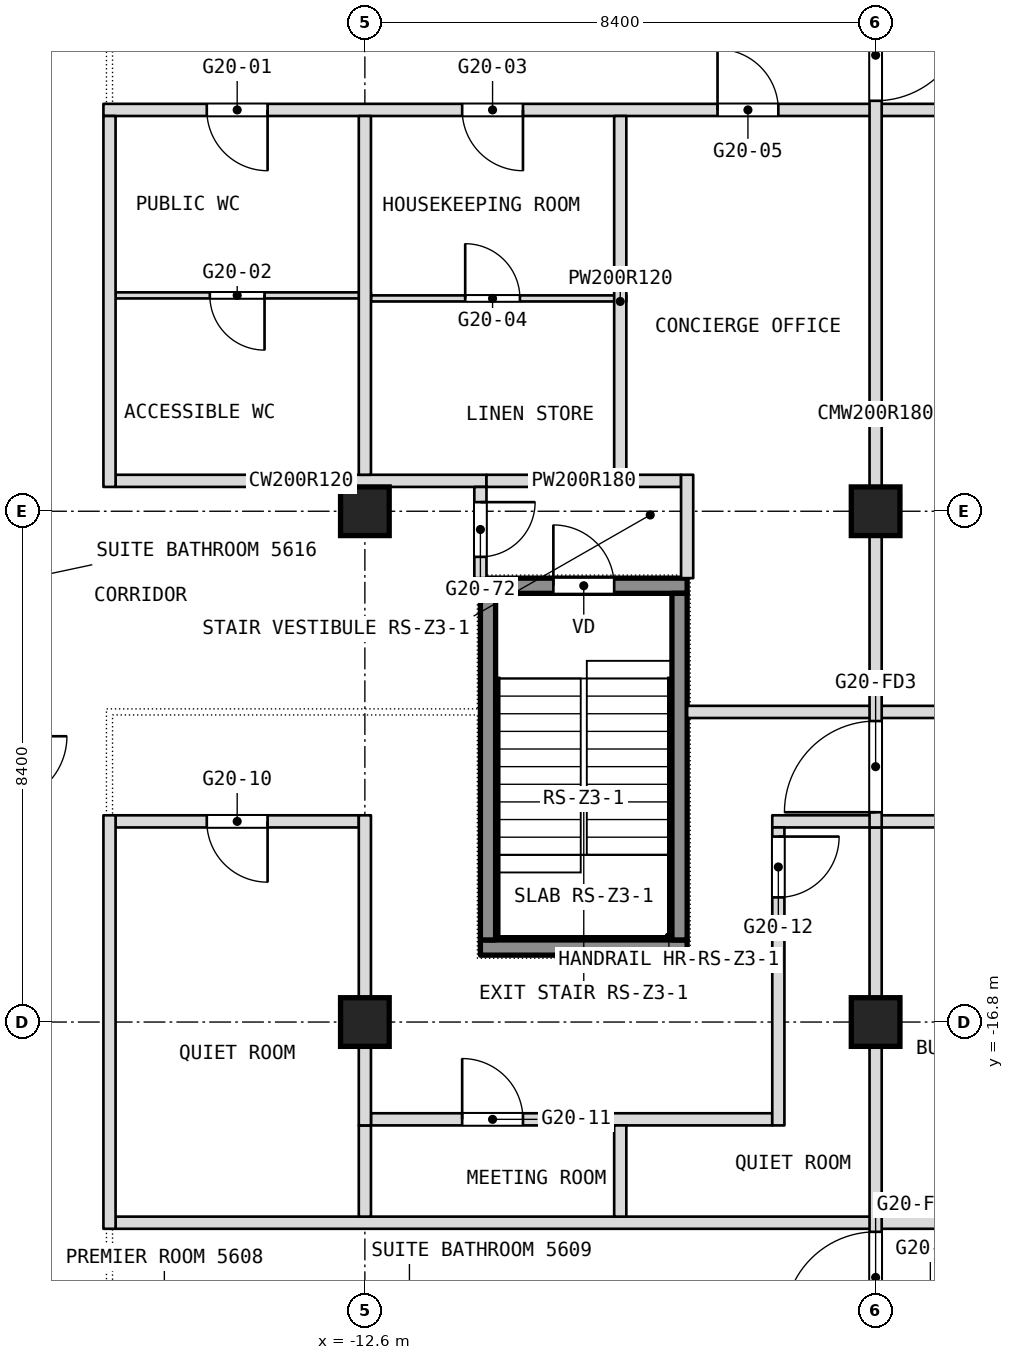
"""IFC4 building model, lengths in metres.
Left out: names, types, materials, properties, quantities, classifications, styles, units other than length and angle.
Written with IfcOpenShell. Run it as: python <this file> out.ifc"""

import sys

from ifc_helpers import new_model, si_unit, direction, frame, frame_2d, origin, origin_2d, place, context, subcontext, project, spatial, rectangle, extrude, element, fill, save


model = new_model("IFC4")
c1 = context("Model", 3, precision=1e-05, world=origin(), true_north=direction((0.0, 1.0)))
c2 = subcontext(c1, "Body", "Model", "MODEL_VIEW")
j1 = project(units=[si_unit("LENGTHUNIT", "METRE"), si_unit("PLANEANGLEUNIT", "RADIAN")], contexts=[c1])
p1 = place(None, origin())
s1 = spatial("IfcSite", under=j1, at=p1, CompositionType="ELEMENT")
p2 = place(p1, origin())
s2 = spatial("IfcBuilding", under=s1, at=p2, CompositionType="ELEMENT")
p3 = place(p2, frame((0.0, 0.0, 238.1)))
s3 = spatial("IfcBuildingStorey", under=s2, at=p3, CompositionType="ELEMENT", Elevation=238.1)
for number, where, z_axis, x_axis in (
    (1, (-12.6, -16.8, 0.0), (0.0, 0.0, 1.0), (1.0, 0.0, 0.0)),
    (2, (-12.6, -8.4, 0.0), (0.0, 0.0, 1.0), (1.0, 0.0, 0.0)),
    (3, (-4.2, -16.8, 0.0), (0.0, 0.0, 1.0), (1.0, 0.0, 0.0)),
    (4, (-4.2, -8.4, 0.0), (0.0, 0.0, 1.0), (1.0, 0.0, 0.0)),
):
    element("IfcColumn", number, at=place(p3, frame(where, z_axis=z_axis, x_axis=x_axis)), inside=s3, PredefinedType="COLUMN", context=c2, shape_type="SweptSolid", body=[
        extrude(rectangle(XDim=0.8, YDim=0.8, at=origin_2d()), origin(), (0.0, 0.0, 1.0), 3.6),
    ])
p4 = place(p3, frame((-16.7, -20.1, 0.0), z_axis=(0.0, 0.0, 1.0), x_axis=(1.0, 0.0, 0.0)))
e5 = element("IfcWall", 5, at=p4, inside=s3, PredefinedType="PARTITIONING", context=c2, shape_type="SweptSolid", body=[
    extrude(rectangle(XDim=33.4, YDim=0.2, at=frame_2d((16.7, 0.0))), origin(), (0.0, 0.0, 1.0), 3.34),
])
p5 = place(p3, frame((-12.5, -18.4, 0.0), z_axis=(0.0, 0.0, 1.0), x_axis=(1.0, 0.0, 0.0)))
e6 = element("IfcWall", 6, at=p5, inside=s3, PredefinedType="PARTITIONING", context=c2, shape_type="SweptSolid", body=[
    extrude(rectangle(XDim=6.6, YDim=0.2, at=frame_2d((3.3, 0.0))), origin(), (0.0, 0.0, 1.0), 3.34),
])
p6 = place(p5, frame((1.5, 0.0, 0.0)))
e7 = element("IfcOpeningElement", 7, at=p6, cuts=e6, PredefinedType="OPENING", context=c2, shape_type="SweptSolid", body=[
    extrude(rectangle(XDim=1.0, YDim=2.1, at=frame_2d((0.5, 1.05))), frame((0.0, 0.1, 0.0), z_axis=(0.0, -1.0, 0.0), x_axis=(1.0, 0.0, 0.0)), (0.0, 0.0, 1.0), 0.2),
])
p7 = place(p3, frame((-16.7, -13.5, 0.0), z_axis=(0.0, 0.0, 1.0), x_axis=(1.0, 0.0, 0.0)))
e8 = element("IfcWall", 8, at=p7, inside=s3, PredefinedType="PARTITIONING", context=c2, shape_type="SweptSolid", body=[
    extrude(rectangle(XDim=4.0, YDim=0.2, at=frame_2d((2.0, 0.0))), origin(), (0.0, 0.0, 1.0), 3.34),
])
p8 = place(p7, frame((1.5, 0.0, 0.0)))
e9 = element("IfcOpeningElement", 9, at=p8, cuts=e8, PredefinedType="OPENING", context=c2, shape_type="SweptSolid", body=[
    extrude(rectangle(XDim=1.0, YDim=2.1, at=frame_2d((0.5, 1.05))), frame((0.0, 0.1, 0.0), z_axis=(0.0, -1.0, 0.0), x_axis=(1.0, 0.0, 0.0)), (0.0, 0.0, 1.0), 0.2),
])
p9 = place(p3, frame((-5.9, -13.5, 0.0), z_axis=(0.0, 0.0, 1.0), x_axis=(1.0, 0.0, 0.0)))
e10 = element("IfcWall", 10, at=p9, inside=s3, PredefinedType="PARTITIONING", context=c2, shape_type="SweptSolid", body=[
    extrude(rectangle(XDim=11.6, YDim=0.2, at=frame_2d((5.8, 0.0))), origin(), (0.0, 0.0, 1.0), 3.34),
])
p10 = place(p9, frame((3.3, 0.0, 0.0)))
e11 = element("IfcOpeningElement", 11, at=p10, cuts=e10, PredefinedType="OPENING", context=c2, shape_type="SweptSolid", body=[
    extrude(rectangle(XDim=1.0, YDim=2.1, at=frame_2d((0.5, 1.05))), frame((0.0, 0.1, 0.0), z_axis=(0.0, -1.0, 0.0), x_axis=(1.0, 0.0, 0.0)), (0.0, 0.0, 1.0), 0.2),
])
p11 = place(p9, frame((7.5, 0.0, 0.0)))
e12 = element("IfcOpeningElement", 12, at=p11, cuts=e10, PredefinedType="OPENING", context=c2, shape_type="SweptSolid", body=[
    extrude(rectangle(XDim=1.0, YDim=2.1, at=frame_2d((0.5, 1.05))), frame((0.0, 0.1, 0.0), z_axis=(0.0, -1.0, 0.0), x_axis=(1.0, 0.0, 0.0)), (0.0, 0.0, 1.0), 0.2),
])
p12 = place(p3, frame((-7.3, -11.7, 0.0), z_axis=(0.0, 0.0, 1.0), x_axis=(1.0, 0.0, 0.0)))
e13 = element("IfcWall", 13, at=p12, inside=s3, PredefinedType="PARTITIONING", context=c2, shape_type="SweptSolid", body=[
    extrude(rectangle(XDim=14.6, YDim=0.2, at=frame_2d((7.3, 0.0))), origin(), (0.0, 0.0, 1.0), 3.34),
])
p13 = place(p3, frame((-16.7, -7.9, 0.0), z_axis=(0.0, 0.0, 1.0), x_axis=(1.0, 0.0, 0.0)))
e14 = element("IfcWall", 14, at=p13, inside=s3, PredefinedType="PARTITIONING", context=c2, shape_type="SweptSolid", body=[
    extrude(rectangle(XDim=6.1, YDim=0.2, at=frame_2d((3.05, 0.0))), origin(), (0.0, 0.0, 1.0), 3.34),
])
p14 = place(p3, frame((-10.6, -7.9, 0.0), z_axis=(0.0, 0.0, 1.0), x_axis=(1.0, 0.0, 0.0)))
e15 = element("IfcWall", 15, at=p14, inside=s3, PredefinedType="PARTITIONING", context=c2, shape_type="SweptSolid", body=[
    extrude(rectangle(XDim=3.2, YDim=0.2, at=frame_2d((1.6, 0.0))), origin(), (0.0, 0.0, 1.0), 3.34),
])
p15 = place(p3, frame((-12.5, -4.9, 0.0), z_axis=(0.0, 0.0, 1.0), x_axis=(1.0, 0.0, 0.0)))
e16 = element("IfcWall", 16, at=p15, inside=s3, PredefinedType="PARTITIONING", context=c2, shape_type="SweptSolid", body=[
    extrude(rectangle(XDim=4.2, YDim=0.1, at=frame_2d((2.1, 0.0))), origin(), (0.0, 0.0, 1.0), 3.34),
])
p16 = place(p15, frame((1.55, 0.0, 0.0)))
e17 = element("IfcOpeningElement", 17, at=p16, cuts=e16, PredefinedType="OPENING", context=c2, shape_type="SweptSolid", body=[
    extrude(rectangle(XDim=0.9, YDim=2.1, at=frame_2d((0.45, 1.05))), frame((0.0, 0.05, 0.0), z_axis=(0.0, -1.0, 0.0), x_axis=(1.0, 0.0, 0.0)), (0.0, 0.0, 1.0), 0.1),
])
p17 = place(p3, frame((-16.7, -4.85, 0.0), z_axis=(0.0, 0.0, 1.0), x_axis=(1.0, 0.0, 0.0)))
e18 = element("IfcWall", 18, at=p17, inside=s3, PredefinedType="PARTITIONING", context=c2, shape_type="SweptSolid", body=[
    extrude(rectangle(XDim=4.2, YDim=0.1, at=frame_2d((2.1, 0.0))), origin(), (0.0, 0.0, 1.0), 3.34),
])
p18 = place(p17, frame((1.55, 0.0, 0.0)))
e19 = element("IfcOpeningElement", 19, at=p18, cuts=e18, PredefinedType="OPENING", context=c2, shape_type="SweptSolid", body=[
    extrude(rectangle(XDim=0.9, YDim=2.1, at=frame_2d((0.45, 1.05))), frame((0.0, 0.05, 0.0), z_axis=(0.0, -1.0, 0.0), x_axis=(1.0, 0.0, 0.0)), (0.0, 0.0, 1.0), 0.1),
])
p19 = place(p3, frame((-16.9, -1.8, 0.0), z_axis=(0.0, 0.0, 1.0), x_axis=(1.0, 0.0, 0.0)))
e20 = element("IfcWall", 20, at=p19, inside=s3, PredefinedType="PARTITIONING", context=c2, shape_type="SweptSolid", body=[
    extrude(rectangle(XDim=33.8, YDim=0.2, at=frame_2d((16.9, 0.0))), origin(), (0.0, 0.0, 1.0), 3.34),
])
p20 = place(p19, frame((1.7, 0.0, 0.0)))
e21 = element("IfcOpeningElement", 21, at=p20, cuts=e20, PredefinedType="OPENING", context=c2, shape_type="SweptSolid", body=[
    extrude(rectangle(XDim=1.0, YDim=2.1, at=frame_2d((0.5, 1.05))), frame((0.0, 0.1, 0.0), z_axis=(0.0, -1.0, 0.0), x_axis=(1.0, 0.0, 0.0)), (0.0, 0.0, 1.0), 0.2),
])
p21 = place(p19, frame((5.9, 0.0, 0.0)))
e22 = element("IfcOpeningElement", 22, at=p21, cuts=e20, PredefinedType="OPENING", context=c2, shape_type="SweptSolid", body=[
    extrude(rectangle(XDim=1.0, YDim=2.1, at=frame_2d((0.5, 1.05))), frame((0.0, 0.1, 0.0), z_axis=(0.0, -1.0, 0.0), x_axis=(1.0, 0.0, 0.0)), (0.0, 0.0, 1.0), 0.2),
])
p22 = place(p19, frame((10.1, 0.0, 0.0)))
e23 = element("IfcOpeningElement", 23, at=p22, cuts=e20, PredefinedType="OPENING", context=c2, shape_type="SweptSolid", body=[
    extrude(rectangle(XDim=1.0, YDim=2.1, at=frame_2d((0.5, 1.05))), frame((0.0, 0.1, 0.0), z_axis=(0.0, -1.0, 0.0), x_axis=(1.0, 0.0, 0.0)), (0.0, 0.0, 1.0), 0.2),
])
p23 = place(p19, frame((16.0, 0.0, 0.0)))
e24 = element("IfcOpeningElement", 24, at=p23, cuts=e20, PredefinedType="OPENING", context=c2, shape_type="SweptSolid", body=[
    extrude(rectangle(XDim=1.8, YDim=2.1, at=frame_2d((0.9, 1.05))), frame((0.0, 0.1, 0.0), z_axis=(0.0, -1.0, 0.0), x_axis=(1.0, 0.0, 0.0)), (0.0, 0.0, 1.0), 0.2),
])
p24 = place(p19, frame((22.7, 0.0, 0.0)))
e25 = element("IfcOpeningElement", 25, at=p24, cuts=e20, PredefinedType="OPENING", context=c2, shape_type="SweptSolid", body=[
    extrude(rectangle(XDim=1.0, YDim=2.1, at=frame_2d((0.5, 1.05))), frame((0.0, 0.1, 0.0), z_axis=(0.0, -1.0, 0.0), x_axis=(1.0, 0.0, 0.0)), (0.0, 0.0, 1.0), 0.2),
])
p25 = place(p19, frame((26.9, 0.0, 0.0)))
e26 = element("IfcOpeningElement", 26, at=p25, cuts=e20, PredefinedType="OPENING", context=c2, shape_type="SweptSolid", body=[
    extrude(rectangle(XDim=1.0, YDim=2.1, at=frame_2d((0.5, 1.05))), frame((0.0, 0.1, 0.0), z_axis=(0.0, -1.0, 0.0), x_axis=(1.0, 0.0, 0.0)), (0.0, 0.0, 1.0), 0.2),
])
p26 = place(p19, frame((31.1, 0.0, 0.0)))
e27 = element("IfcOpeningElement", 27, at=p26, cuts=e20, PredefinedType="OPENING", context=c2, shape_type="SweptSolid", body=[
    extrude(rectangle(XDim=1.0, YDim=2.1, at=frame_2d((0.5, 1.05))), frame((0.0, 0.1, 0.0), z_axis=(0.0, -1.0, 0.0), x_axis=(1.0, 0.0, 0.0)), (0.0, 0.0, 1.0), 0.2),
])
p27 = place(p3, frame((-4.2, -22.0, 0.0), z_axis=(0.0, 0.0, 1.0), x_axis=(0.0, 1.0, 0.0)))
e28 = element("IfcWall", 28, at=p27, inside=s3, PredefinedType="PARTITIONING", context=c2, shape_type="SweptSolid", body=[
    extrude(rectangle(XDim=8.4, YDim=0.2, at=frame_2d((4.2, 0.0))), origin(), (0.0, 0.0, 1.0), 3.34),
])
p28 = place(p27, frame((0.25, 0.0, 0.0)))
e29 = element("IfcOpeningElement", 29, at=p28, cuts=e28, PredefinedType="OPENING", context=c2, shape_type="SweptSolid", body=[
    extrude(rectangle(XDim=1.5, YDim=2.1, at=frame_2d((0.75, 1.05))), frame((0.0, 0.1, 0.0), z_axis=(0.0, -1.0, 0.0), x_axis=(1.0, 0.0, 0.0)), (0.0, 0.0, 1.0), 0.2),
])
p29 = place(p3, frame((-4.2, -13.6, 0.0), z_axis=(0.0, 0.0, 1.0), x_axis=(0.0, 1.0, 0.0)))
e30 = element("IfcWall", 30, at=p29, inside=s3, PredefinedType="PARTITIONING", context=c2, shape_type="SweptSolid", body=[
    extrude(rectangle(XDim=13.6, YDim=0.2, at=frame_2d((6.8, 0.0))), origin(), (0.0, 0.0, 1.0), 3.34),
])
p30 = place(p29, frame((11.95, 0.0, 0.0)))
e31 = element("IfcOpeningElement", 31, at=p30, cuts=e30, PredefinedType="OPENING", context=c2, shape_type="SweptSolid", body=[
    extrude(rectangle(XDim=1.5, YDim=2.1, at=frame_2d((0.75, 1.05))), frame((0.0, 0.1, 0.0), z_axis=(0.0, -1.0, 0.0), x_axis=(1.0, 0.0, 0.0)), (0.0, 0.0, 1.0), 0.2),
])
p31 = place(p29, frame((0.25, 0.0, 0.0)))
e32 = element("IfcOpeningElement", 32, at=p31, cuts=e30, PredefinedType="OPENING", context=c2, shape_type="SweptSolid", body=[
    extrude(rectangle(XDim=1.5, YDim=2.1, at=frame_2d((0.75, 1.05))), frame((0.0, 0.1, 0.0), z_axis=(0.0, -1.0, 0.0), x_axis=(1.0, 0.0, 0.0)), (0.0, 0.0, 1.0), 0.2),
])
p32 = place(p3, frame((-5.8, -18.5, 0.0), z_axis=(0.0, 0.0, 1.0), x_axis=(0.0, 1.0, 0.0)))
e33 = element("IfcWall", 33, at=p32, inside=s3, PredefinedType="PARTITIONING", context=c2, shape_type="SweptSolid", body=[
    extrude(rectangle(XDim=4.9, YDim=0.2, at=frame_2d((2.45, 0.0))), origin(), (0.0, 0.0, 1.0), 3.34),
])
p33 = place(p32, frame((3.75, 0.0, 0.0)))
e34 = element("IfcOpeningElement", 34, at=p33, cuts=e33, PredefinedType="OPENING", context=c2, shape_type="SweptSolid", body=[
    extrude(rectangle(XDim=1.0, YDim=2.1, at=frame_2d((0.5, 1.05))), frame((0.0, 0.1, 0.0), z_axis=(0.0, -1.0, 0.0), x_axis=(1.0, 0.0, 0.0)), (0.0, 0.0, 1.0), 0.2),
])
p34 = place(p3, frame((-7.3, -9.5, 0.0), z_axis=(0.0, 0.0, 1.0), x_axis=(0.0, 1.0, 0.0)))
e35 = element("IfcWall", 35, at=p34, inside=s3, PredefinedType="PARTITIONING", context=c2, shape_type="SweptSolid", body=[
    extrude(rectangle(XDim=1.7, YDim=0.2, at=frame_2d((0.85, 0.0))), origin(), (0.0, 0.0, 1.0), 3.34),
])
p35 = place(p3, frame((-8.4, -20.0, 0.0), z_axis=(0.0, 0.0, 1.0), x_axis=(0.0, 1.0, 0.0)))
e36 = element("IfcWall", 36, at=p35, inside=s3, PredefinedType="PARTITIONING", context=c2, shape_type="SweptSolid", body=[
    extrude(rectangle(XDim=1.5, YDim=0.2, at=frame_2d((0.75, 0.0))), origin(), (0.0, 0.0, 1.0), 3.34),
])
p36 = place(p3, frame((-8.4, -8.0, 0.0), z_axis=(0.0, 0.0, 1.0), x_axis=(0.0, 1.0, 0.0)))
e37 = element("IfcWall", 37, at=p36, inside=s3, PredefinedType="PARTITIONING", context=c2, shape_type="SweptSolid", body=[
    extrude(rectangle(XDim=6.1, YDim=0.2, at=frame_2d((3.05, 0.0))), origin(), (0.0, 0.0, 1.0), 3.34),
])
p37 = place(p3, frame((-10.7, -9.5, 0.0), z_axis=(0.0, 0.0, 1.0), x_axis=(0.0, 1.0, 0.0)))
e38 = element("IfcWall", 38, at=p37, inside=s3, PredefinedType="PARTITIONING", context=c2, shape_type="SweptSolid", body=[
    extrude(rectangle(XDim=1.5, YDim=0.2, at=frame_2d((0.75, 0.0))), origin(), (0.0, 0.0, 1.0), 3.34),
])
p38 = place(p37, frame((0.35, 0.0, 0.0)))
e39 = element("IfcOpeningElement", 39, at=p38, cuts=e38, PredefinedType="OPENING", context=c2, shape_type="SweptSolid", body=[
    extrude(rectangle(XDim=0.9, YDim=2.1, at=frame_2d((0.45, 1.05))), frame((0.0, 0.1, 0.0), z_axis=(0.0, -1.0, 0.0), x_axis=(1.0, 0.0, 0.0)), (0.0, 0.0, 1.0), 0.2),
])
p39 = place(p3, frame((-12.6, -20.0, 0.0), z_axis=(0.0, 0.0, 1.0), x_axis=(0.0, 1.0, 0.0)))
e40 = element("IfcWall", 40, at=p39, inside=s3, PredefinedType="PARTITIONING", context=c2, shape_type="SweptSolid", body=[
    extrude(rectangle(XDim=1.5, YDim=0.2, at=frame_2d((0.75, 0.0))), origin(), (0.0, 0.0, 1.0), 3.34),
])
p40 = place(p3, frame((-12.6, -7.8, 0.0), z_axis=(0.0, 0.0, 1.0), x_axis=(0.0, 1.0, 0.0)))
e41 = element("IfcWall", 41, at=p40, inside=s3, PredefinedType="PARTITIONING", context=c2, shape_type="SweptSolid", body=[
    extrude(rectangle(XDim=5.9, YDim=0.2, at=frame_2d((2.95, 0.0))), origin(), (0.0, 0.0, 1.0), 3.34),
])
p41 = place(p3, frame((-12.6, -18.5, 0.0), z_axis=(0.0, 0.0, 1.0), x_axis=(0.0, 1.0, 0.0)))
e42 = element("IfcWall", 42, at=p41, inside=s3, PredefinedType="PARTITIONING", context=c2, shape_type="SweptSolid", body=[
    extrude(rectangle(XDim=5.1, YDim=0.2, at=frame_2d((2.55, 0.0))), origin(), (0.0, 0.0, 1.0), 3.34),
])
p42 = place(p3, frame((-16.8, -20.2, 0.0), z_axis=(0.0, 0.0, 1.0), x_axis=(0.0, 1.0, 0.0)))
e43 = element("IfcWall", 43, at=p42, inside=s3, PredefinedType="PARTITIONING", context=c2, shape_type="SweptSolid", body=[
    extrude(rectangle(XDim=6.8, YDim=0.2, at=frame_2d((3.4, 0.0))), origin(), (0.0, 0.0, 1.0), 3.34),
])
p43 = place(p3, frame((-16.8, -8.0, 0.0), z_axis=(0.0, 0.0, 1.0), x_axis=(0.0, 1.0, 0.0)))
e44 = element("IfcWall", 44, at=p43, inside=s3, PredefinedType="PARTITIONING", context=c2, shape_type="SweptSolid", body=[
    extrude(rectangle(XDim=6.1, YDim=0.2, at=frame_2d((3.05, 0.0))), origin(), (0.0, 0.0, 1.0), 3.34),
])
p44 = place(p3, frame((-10.7, -15.575, 0.1), z_axis=(0.0, 0.0, 1.0), x_axis=(1.0, 0.0, 0.0)))
e45 = element("IfcWall", 45, at=p44, inside=s3, PredefinedType="SHEAR", context=c2, shape_type="SweptSolid", body=[
    extrude(rectangle(XDim=3.4, YDim=0.25, at=frame_2d((1.7, 0.0))), origin(), (0.0, 0.0, 1.0), 3.6),
])
p45 = place(p3, frame((-10.7, -9.625, 0.1), z_axis=(0.0, 0.0, 1.0), x_axis=(1.0, 0.0, 0.0)))
e46 = element("IfcWall", 46, at=p45, inside=s3, PredefinedType="SHEAR", context=c2, shape_type="SweptSolid", body=[
    extrude(rectangle(XDim=3.4, YDim=0.25, at=frame_2d((1.7, 0.0))), origin(), (0.0, 0.0, 1.0), 3.6),
])
p46 = place(p45, frame((1.2, 0.0, 0.0)))
e47 = element("IfcOpeningElement", 47, at=p46, cuts=e46, PredefinedType="OPENING", context=c2, shape_type="SweptSolid", body=[
    extrude(rectangle(XDim=1.0, YDim=2.1, at=frame_2d((0.5, 1.05))), frame((0.0, 0.125, 0.0), z_axis=(0.0, -1.0, 0.0), x_axis=(1.0, 0.0, 0.0)), (0.0, 0.0, 1.0), 0.25),
])
for number, where, z_axis, x_axis in (
    (48, (-10.575, -15.45, 0.1), (0.0, 0.0, 1.0), (0.0, 1.0, 0.0)),
    (49, (-7.425, -15.45, 0.1), (0.0, 0.0, 1.0), (0.0, 1.0, 0.0)),
):
    element("IfcWall", number, at=place(p3, frame(where, z_axis=z_axis, x_axis=x_axis)), inside=s3, PredefinedType="SHEAR", context=c2, shape_type="SweptSolid", body=[
        extrude(rectangle(XDim=5.7, YDim=0.25, at=frame_2d((2.85, 0.0))), origin(), (0.0, 0.0, 1.0), 3.6),
    ])
p47 = place(p6, origin())
e50 = element("IfcDoor", 50, at=p47, inside=s3, OperationType="SINGLE_SWING_RIGHT", PredefinedType="DOOR", context=c2, shape_type="SweptSolid", body=[
    extrude(rectangle(XDim=1.0, YDim=2.1, at=frame_2d((0.5, 1.05))), frame((0.0, 0.025, 0.0), z_axis=(0.0, -1.0, 0.0), x_axis=(1.0, 0.0, 0.0)), (0.0, 0.0, 1.0), 0.05),
])
fill(e7, e50)
p48 = place(p8, origin())
e51 = element("IfcDoor", 51, at=p48, inside=s3, OperationType="SINGLE_SWING_RIGHT", PredefinedType="DOOR", context=c2, shape_type="SweptSolid", body=[
    extrude(rectangle(XDim=1.0, YDim=2.1, at=frame_2d((0.5, 1.05))), frame((0.0, 0.025, 0.0), z_axis=(0.0, -1.0, 0.0), x_axis=(1.0, 0.0, 0.0)), (0.0, 0.0, 1.0), 0.05),
])
fill(e9, e51)
p49 = place(p16, origin())
e52 = element("IfcDoor", 52, at=p49, inside=s3, OperationType="SINGLE_SWING_RIGHT", PredefinedType="DOOR", context=c2, shape_type="SweptSolid", body=[
    extrude(rectangle(XDim=0.9, YDim=2.1, at=frame_2d((0.45, 1.05))), frame((0.0, 0.025, 0.0), z_axis=(0.0, -1.0, 0.0), x_axis=(1.0, 0.0, 0.0)), (0.0, 0.0, 1.0), 0.05),
])
fill(e17, e52)
p50 = place(p18, origin())
e53 = element("IfcDoor", 53, at=p50, inside=s3, OperationType="SINGLE_SWING_RIGHT", PredefinedType="DOOR", context=c2, shape_type="SweptSolid", body=[
    extrude(rectangle(XDim=0.9, YDim=2.1, at=frame_2d((0.45, 1.05))), frame((0.0, 0.025, 0.0), z_axis=(0.0, -1.0, 0.0), x_axis=(1.0, 0.0, 0.0)), (0.0, 0.0, 1.0), 0.05),
])
fill(e19, e53)
p51 = place(p20, origin())
e54 = element("IfcDoor", 54, at=p51, inside=s3, OperationType="SINGLE_SWING_LEFT", PredefinedType="DOOR", context=c2, shape_type="SweptSolid", body=[
    extrude(rectangle(XDim=1.0, YDim=2.1, at=frame_2d((0.5, 1.05))), frame((0.0, 0.025, 0.0), z_axis=(0.0, -1.0, 0.0), x_axis=(1.0, 0.0, 0.0)), (0.0, 0.0, 1.0), 0.05),
])
fill(e21, e54)
p52 = place(p21, origin())
e55 = element("IfcDoor", 55, at=p52, inside=s3, OperationType="SINGLE_SWING_LEFT", PredefinedType="DOOR", context=c2, shape_type="SweptSolid", body=[
    extrude(rectangle(XDim=1.0, YDim=2.1, at=frame_2d((0.5, 1.05))), frame((0.0, 0.025, 0.0), z_axis=(0.0, -1.0, 0.0), x_axis=(1.0, 0.0, 0.0)), (0.0, 0.0, 1.0), 0.05),
])
fill(e22, e55)
p53 = place(p22, origin())
e56 = element("IfcDoor", 56, at=p53, inside=s3, OperationType="SINGLE_SWING_RIGHT", PredefinedType="DOOR", context=c2, shape_type="SweptSolid", body=[
    extrude(rectangle(XDim=1.0, YDim=2.1, at=frame_2d((0.5, 1.05))), frame((0.0, 0.025, 0.0), z_axis=(0.0, -1.0, 0.0), x_axis=(1.0, 0.0, 0.0)), (0.0, 0.0, 1.0), 0.05),
])
fill(e23, e56)
p54 = place(p33, origin())
e57 = element("IfcDoor", 57, at=p54, inside=s3, OperationType="SINGLE_SWING_RIGHT", PredefinedType="DOOR", context=c2, shape_type="SweptSolid", body=[
    extrude(rectangle(XDim=1.0, YDim=2.1, at=frame_2d((0.5, 1.05))), frame((0.0, 0.025, 0.0), z_axis=(0.0, -1.0, 0.0), x_axis=(1.0, 0.0, 0.0)), (0.0, 0.0, 1.0), 0.05),
])
fill(e34, e57)
p55 = place(p38, origin())
e58 = element("IfcDoor", 58, at=p55, inside=s3, OperationType="SINGLE_SWING_LEFT", PredefinedType="DOOR", context=c2, shape_type="SweptSolid", body=[
    extrude(rectangle(XDim=0.9, YDim=2.1, at=frame_2d((0.45, 1.05))), frame((0.0, 0.025, 0.0), z_axis=(0.0, -1.0, 0.0), x_axis=(1.0, 0.0, 0.0)), (0.0, 0.0, 1.0), 0.05),
])
fill(e39, e58)
p56 = place(p46, origin())
e59 = element("IfcDoor", 59, at=p56, inside=s3, OperationType="SINGLE_SWING_LEFT", PredefinedType="DOOR", context=c2, shape_type="SweptSolid", body=[
    extrude(rectangle(XDim=1.0, YDim=2.1, at=frame_2d((0.5, 1.05))), frame((0.0, 0.025, 0.0), z_axis=(0.0, -1.0, 0.0), x_axis=(1.0, 0.0, 0.0)), (0.0, 0.0, 1.0), 0.05),
])
fill(e47, e59)
p57 = place(p30, origin())
e60 = element("IfcDoor", 60, at=p57, inside=s3, OperationType="DOUBLE_DOOR_DOUBLE_SWING", PredefinedType="DOOR", context=c2, shape_type="SweptSolid", body=[
    extrude(rectangle(XDim=1.5, YDim=2.1, at=frame_2d((0.75, 1.05))), frame((0.0, 0.025, 0.0), z_axis=(0.0, -1.0, 0.0), x_axis=(1.0, 0.0, 0.0)), (0.0, 0.0, 1.0), 0.05),
])
fill(e31, e60)
p58 = place(p31, origin())
e61 = element("IfcDoor", 61, at=p58, inside=s3, OperationType="DOUBLE_DOOR_DOUBLE_SWING", PredefinedType="DOOR", context=c2, shape_type="SweptSolid", body=[
    extrude(rectangle(XDim=1.5, YDim=2.1, at=frame_2d((0.75, 1.05))), frame((0.0, 0.025, 0.0), z_axis=(0.0, -1.0, 0.0), x_axis=(1.0, 0.0, 0.0)), (0.0, 0.0, 1.0), 0.05),
])
fill(e32, e61)
p59 = place(p28, origin())
e62 = element("IfcDoor", 62, at=p59, inside=s3, OperationType="DOUBLE_DOOR_DOUBLE_SWING", PredefinedType="DOOR", context=c2, shape_type="SweptSolid", body=[
    extrude(rectangle(XDim=1.5, YDim=2.1, at=frame_2d((0.75, 1.05))), frame((0.0, 0.025, 0.0), z_axis=(0.0, -1.0, 0.0), x_axis=(1.0, 0.0, 0.0)), (0.0, 0.0, 1.0), 0.05),
])
fill(e29, e62)
save(model, sys.argv[1])
